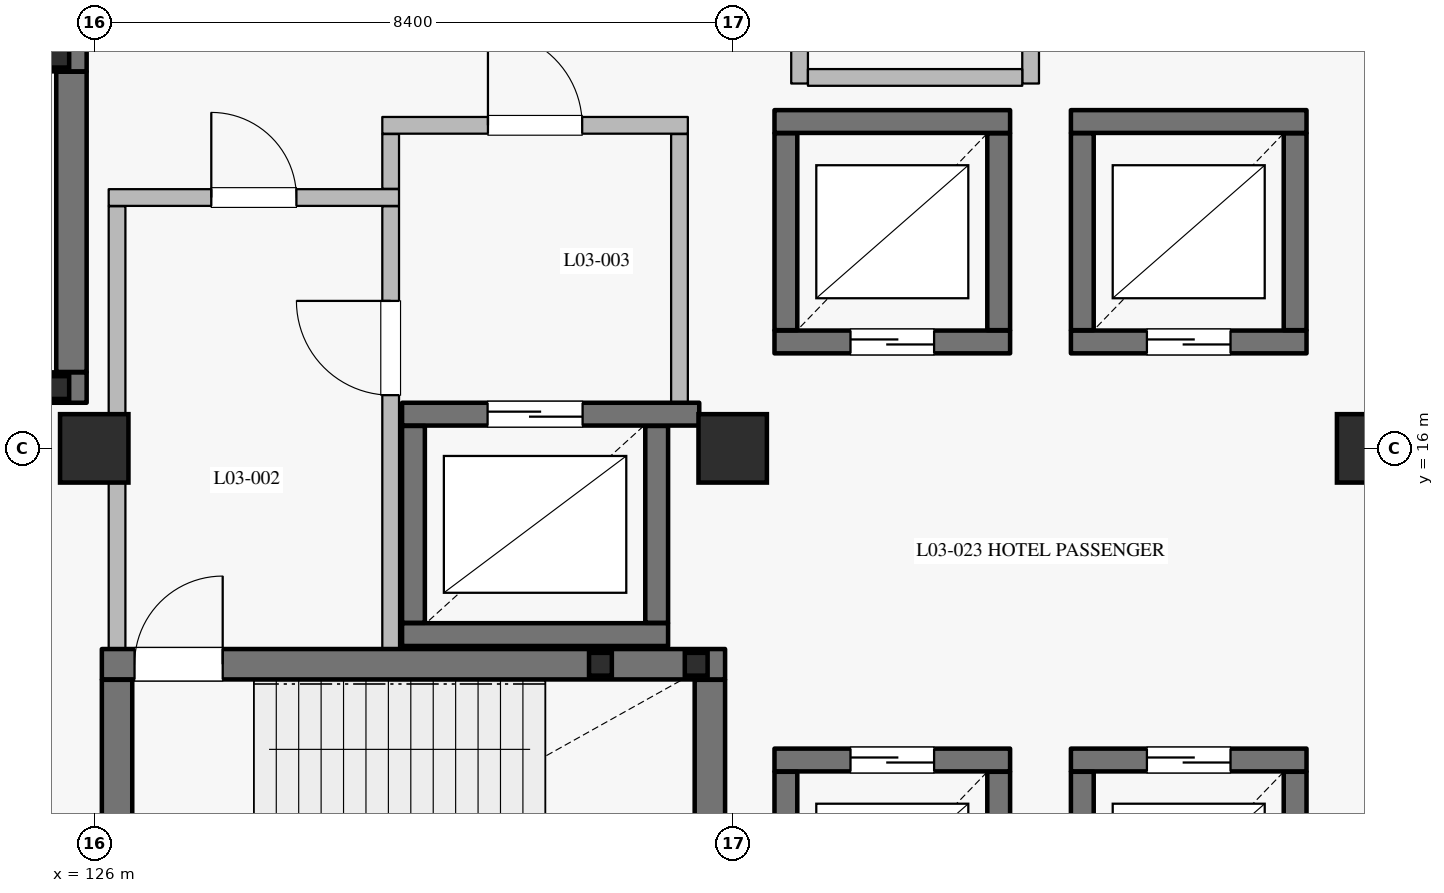
"""IFC4 building model, lengths in metres.
Left out: names, types, materials, properties, quantities, classifications, styles, units other than length and angle.
Written with IfcOpenShell. Run it as: python <this file> out.ifc"""

import sys

from ifc_helpers import new_model, si_unit, direction, frame, frame_2d, origin, origin_2d, place, context, subcontext, project, spatial, rectangle, hollow_rectangle, extrude, element, fill, save


model = new_model("IFC4")
c1 = context("Model", 3, precision=1e-05, world=origin(), true_north=direction((0.0, 1.0)))
c2 = subcontext(c1, "Body", "Model", "MODEL_VIEW")
j1 = project(units=[si_unit("LENGTHUNIT", "METRE"), si_unit("PLANEANGLEUNIT", "RADIAN")], contexts=[c1])
p1 = place(None, origin())
s1 = spatial("IfcSite", under=j1, at=p1, CompositionType="ELEMENT")
p2 = place(p1, origin())
s2 = spatial("IfcBuilding", under=s1, at=p2, CompositionType="ELEMENT")
p3 = place(p2, frame((0.0, 0.0, 16.2)))
s3 = spatial("IfcBuildingStorey", under=s2, at=p3, CompositionType="ELEMENT", Elevation=16.2)
for number, where, z_axis, x_axis in (
    (1, (126.0, 16.0, 0.0), (0.0, 0.0, 1.0), (1.0, 0.0, 0.0)),
    (2, (134.4, 16.0, 0.0), (0.0, 0.0, 1.0), (1.0, 0.0, 0.0)),
    (3, (142.8, 16.0, 0.0), (0.0, 0.0, 1.0), (1.0, 0.0, 0.0)),
):
    element("IfcColumn", number, at=place(p3, frame(where, z_axis=z_axis, x_axis=x_axis)), inside=s3, PredefinedType="COLUMN", context=c2, shape_type="SweptSolid", body=[
        extrude(rectangle(XDim=0.9, YDim=0.9, at=origin_2d()), origin(), (0.0, 0.0, 1.0), 4.8),
    ])
p4 = place(p3, frame((134.95, 17.4, 0.0), z_axis=(0.0, 0.0, 1.0), x_axis=(1.0, 0.0, 0.0)))
e4 = element("IfcWall", 4, at=p4, inside=s3, PredefinedType="SHEAR", context=c2, shape_type="SweptSolid", body=[
    extrude(rectangle(XDim=3.1, YDim=0.3, at=frame_2d((1.55, 0.0))), origin(), (0.0, 0.0, 1.0), 4.535),
])
p5 = place(p4, frame((1.0, 0.0, 0.0)))
e5 = element("IfcOpeningElement", 5, at=p5, cuts=e4, PredefinedType="OPENING", context=c2, shape_type="SweptSolid", body=[
    extrude(rectangle(XDim=1.1, YDim=2.2, at=frame_2d((0.55, 1.1))), frame((0.0, 0.16, 0.0), z_axis=(0.0, -1.0, 0.0), x_axis=(1.0, 0.0, 0.0)), (0.0, 0.0, 1.0), 0.32),
])
p6 = place(p3, frame((137.9, 17.555, 0.0), z_axis=(0.0, 0.0, 1.0), x_axis=(0.0, 1.0, 0.0)))
e6 = element("IfcWall", 6, at=p6, inside=s3, PredefinedType="SHEAR", context=c2, shape_type="SweptSolid", body=[
    extrude(rectangle(XDim=2.59, YDim=0.3, at=frame_2d((1.295, 0.0))), origin(), (0.0, 0.0, 1.0), 4.535),
])
p7 = place(p3, frame((138.05, 20.3, 0.0), z_axis=(0.0, 0.0, 1.0), x_axis=(-1.0, 0.0, 0.0)))
e7 = element("IfcWall", 7, at=p7, inside=s3, PredefinedType="SHEAR", context=c2, shape_type="SweptSolid", body=[
    extrude(rectangle(XDim=3.1, YDim=0.3, at=frame_2d((1.55, 0.0))), origin(), (0.0, 0.0, 1.0), 4.535),
])
p8 = place(p3, frame((135.1, 20.145, 0.0), z_axis=(0.0, 0.0, 1.0), x_axis=(0.0, -1.0, 0.0)))
e8 = element("IfcWall", 8, at=p8, inside=s3, PredefinedType="SHEAR", context=c2, shape_type="SweptSolid", body=[
    extrude(rectangle(XDim=2.59, YDim=0.3, at=frame_2d((1.295, 0.0))), origin(), (0.0, 0.0, 1.0), 4.535),
])
p9 = place(p3, frame((138.85, 17.4, 0.0), z_axis=(0.0, 0.0, 1.0), x_axis=(1.0, 0.0, 0.0)))
e9 = element("IfcWall", 9, at=p9, inside=s3, PredefinedType="SHEAR", context=c2, shape_type="SweptSolid", body=[
    extrude(rectangle(XDim=3.1, YDim=0.3, at=frame_2d((1.55, 0.0))), origin(), (0.0, 0.0, 1.0), 4.535),
])
p10 = place(p9, frame((1.0, 0.0, 0.0)))
e10 = element("IfcOpeningElement", 10, at=p10, cuts=e9, PredefinedType="OPENING", context=c2, shape_type="SweptSolid", body=[
    extrude(rectangle(XDim=1.1, YDim=2.2, at=frame_2d((0.55, 1.1))), frame((0.0, 0.16, 0.0), z_axis=(0.0, -1.0, 0.0), x_axis=(1.0, 0.0, 0.0)), (0.0, 0.0, 1.0), 0.32),
])
p11 = place(p3, frame((141.8, 17.555, 0.0), z_axis=(0.0, 0.0, 1.0), x_axis=(0.0, 1.0, 0.0)))
e11 = element("IfcWall", 11, at=p11, inside=s3, PredefinedType="SHEAR", context=c2, shape_type="SweptSolid", body=[
    extrude(rectangle(XDim=2.59, YDim=0.3, at=frame_2d((1.295, 0.0))), origin(), (0.0, 0.0, 1.0), 4.535),
])
p12 = place(p3, frame((141.95, 20.3, 0.0), z_axis=(0.0, 0.0, 1.0), x_axis=(-1.0, 0.0, 0.0)))
e12 = element("IfcWall", 12, at=p12, inside=s3, PredefinedType="SHEAR", context=c2, shape_type="SweptSolid", body=[
    extrude(rectangle(XDim=3.1, YDim=0.3, at=frame_2d((1.55, 0.0))), origin(), (0.0, 0.0, 1.0), 4.535),
])
for number, where, z_axis, x_axis in (
    (13, (139.0, 20.145, 0.0), (0.0, 0.0, 1.0), (0.0, -1.0, 0.0)),
    (14, (137.9, 9.155, 0.0), (0.0, 0.0, 1.0), (0.0, 1.0, 0.0)),
):
    element("IfcWall", number, at=place(p3, frame(where, z_axis=z_axis, x_axis=x_axis)), inside=s3, PredefinedType="SHEAR", context=c2, shape_type="SweptSolid", body=[
        extrude(rectangle(XDim=2.59, YDim=0.3, at=frame_2d((1.295, 0.0))), origin(), (0.0, 0.0, 1.0), 4.535),
    ])
p13 = place(p3, frame((138.05, 11.9, 0.0), z_axis=(0.0, 0.0, 1.0), x_axis=(-1.0, 0.0, 0.0)))
e15 = element("IfcWall", 15, at=p13, inside=s3, PredefinedType="SHEAR", context=c2, shape_type="SweptSolid", body=[
    extrude(rectangle(XDim=3.1, YDim=0.3, at=frame_2d((1.55, 0.0))), origin(), (0.0, 0.0, 1.0), 4.535),
])
p14 = place(p13, frame((1.0, 0.0, 0.0)))
e16 = element("IfcOpeningElement", 16, at=p14, cuts=e15, PredefinedType="OPENING", context=c2, shape_type="SweptSolid", body=[
    extrude(rectangle(XDim=1.1, YDim=2.2, at=frame_2d((0.55, 1.1))), frame((0.0, 0.16, 0.0), z_axis=(0.0, -1.0, 0.0), x_axis=(1.0, 0.0, 0.0)), (0.0, 0.0, 1.0), 0.32),
])
for number, where, z_axis, x_axis in (
    (17, (135.1, 11.745, 0.0), (0.0, 0.0, 1.0), (0.0, -1.0, 0.0)),
    (18, (141.8, 9.155, 0.0), (0.0, 0.0, 1.0), (0.0, 1.0, 0.0)),
):
    element("IfcWall", number, at=place(p3, frame(where, z_axis=z_axis, x_axis=x_axis)), inside=s3, PredefinedType="SHEAR", context=c2, shape_type="SweptSolid", body=[
        extrude(rectangle(XDim=2.59, YDim=0.3, at=frame_2d((1.295, 0.0))), origin(), (0.0, 0.0, 1.0), 4.535),
    ])
p15 = place(p3, frame((141.95, 11.9, 0.0), z_axis=(0.0, 0.0, 1.0), x_axis=(-1.0, 0.0, 0.0)))
e19 = element("IfcWall", 19, at=p15, inside=s3, PredefinedType="SHEAR", context=c2, shape_type="SweptSolid", body=[
    extrude(rectangle(XDim=3.1, YDim=0.3, at=frame_2d((1.55, 0.0))), origin(), (0.0, 0.0, 1.0), 4.535),
])
p16 = place(p15, frame((1.0, 0.0, 0.0)))
e20 = element("IfcOpeningElement", 20, at=p16, cuts=e19, PredefinedType="OPENING", context=c2, shape_type="SweptSolid", body=[
    extrude(rectangle(XDim=1.1, YDim=2.2, at=frame_2d((0.55, 1.1))), frame((0.0, 0.16, 0.0), z_axis=(0.0, -1.0, 0.0), x_axis=(1.0, 0.0, 0.0)), (0.0, 0.0, 1.0), 0.32),
])
p17 = place(p3, frame((139.0, 11.745, 0.0), z_axis=(0.0, 0.0, 1.0), x_axis=(0.0, -1.0, 0.0)))
e21 = element("IfcWall", 21, at=p17, inside=s3, PredefinedType="SHEAR", context=c2, shape_type="SweptSolid", body=[
    extrude(rectangle(XDim=2.59, YDim=0.3, at=frame_2d((1.295, 0.0))), origin(), (0.0, 0.0, 1.0), 4.535),
])
p18 = place(p3, frame((130.05, 13.55, 0.0), z_axis=(0.0, 0.0, 1.0), x_axis=(1.0, 0.0, 0.0)))
e22 = element("IfcWall", 22, at=p18, inside=s3, PredefinedType="SHEAR", context=c2, shape_type="SweptSolid", body=[
    extrude(rectangle(XDim=3.5, YDim=0.3, at=frame_2d((1.75, 0.0))), origin(), (0.0, 0.0, 1.0), 4.535),
])
p19 = place(p3, frame((133.4, 13.705, 0.0), z_axis=(0.0, 0.0, 1.0), x_axis=(0.0, 1.0, 0.0)))
e23 = element("IfcWall", 23, at=p19, inside=s3, PredefinedType="SHEAR", context=c2, shape_type="SweptSolid", body=[
    extrude(rectangle(XDim=2.59, YDim=0.3, at=frame_2d((1.295, 0.0))), origin(), (0.0, 0.0, 1.0), 4.535),
])
p20 = place(p3, frame((133.96, 16.45, 0.0), z_axis=(0.0, 0.0, 1.0), x_axis=(-1.0, 0.0, 0.0)))
e24 = element("IfcWall", 24, at=p20, inside=s3, PredefinedType="SHEAR", context=c2, shape_type="SweptSolid", body=[
    extrude(rectangle(XDim=3.91, YDim=0.3, at=frame_2d((1.955, 0.0))), origin(), (0.0, 0.0, 1.0), 4.535),
])
p21 = place(p20, frame((1.535, 0.0, 0.0)))
e25 = element("IfcOpeningElement", 25, at=p21, cuts=e24, PredefinedType="OPENING", context=c2, shape_type="SweptSolid", body=[
    extrude(rectangle(XDim=1.25, YDim=2.25, at=frame_2d((0.625, 1.125))), frame((0.0, 0.16, 0.0), z_axis=(0.0, -1.0, 0.0), x_axis=(1.0, 0.0, 0.0)), (0.0, 0.0, 1.0), 0.32),
])
p22 = place(p3, frame((130.2, 16.295, 0.0), z_axis=(0.0, 0.0, 1.0), x_axis=(0.0, -1.0, 0.0)))
e26 = element("IfcWall", 26, at=p22, inside=s3, PredefinedType="SHEAR", context=c2, shape_type="SweptSolid", body=[
    extrude(rectangle(XDim=2.59, YDim=0.3, at=frame_2d((1.295, 0.0))), origin(), (0.0, 0.0, 1.0), 4.535),
])
p23 = place(p3, frame((134.1, 9.005, 0.0), z_axis=(0.0, 0.0, 1.0), x_axis=(0.0, 1.0, 0.0)))
e27 = element("IfcWall", 27, at=p23, inside=s3, PredefinedType="SHEAR", context=c2, shape_type="SweptSolid", body=[
    extrude(rectangle(XDim=3.95, YDim=0.4, at=frame_2d((1.975, 0.0))), origin(), (0.0, 0.0, 1.0), 4.535),
])
p24 = place(p3, frame((126.1, 13.16, 0.0), z_axis=(0.0, 0.0, 1.0), x_axis=(1.0, 0.0, 0.0)))
e28 = element("IfcWall", 28, at=p24, inside=s3, PredefinedType="SHEAR", context=c2, shape_type="SweptSolid", body=[
    extrude(rectangle(XDim=8.2, YDim=0.4, at=frame_2d((4.1, 0.0))), origin(), (0.0, 0.0, 1.0), 4.535),
])
p25 = place(p24, frame((0.43, 0.0, 0.0)))
e29 = element("IfcOpeningElement", 29, at=p25, cuts=e28, PredefinedType="OPENING", context=c2, shape_type="SweptSolid", body=[
    extrude(rectangle(XDim=1.16, YDim=2.2, at=frame_2d((0.58, 1.1))), frame((0.0, 0.21, 0.0), z_axis=(0.0, -1.0, 0.0), x_axis=(1.0, 0.0, 0.0)), (0.0, 0.0, 1.0), 0.42),
])
p26 = place(p3, frame((126.3, 9.005, 0.0), z_axis=(0.0, 0.0, 1.0), x_axis=(0.0, 1.0, 0.0)))
e30 = element("IfcWall", 30, at=p26, inside=s3, PredefinedType="SHEAR", context=c2, shape_type="SweptSolid", body=[
    extrude(rectangle(XDim=3.95, YDim=0.4, at=frame_2d((1.975, 0.0))), origin(), (0.0, 0.0, 1.0), 4.535),
])
p27 = place(p3, frame((126.3, 13.365, 0.0), z_axis=(0.0, 0.0, 1.0), x_axis=(0.0, 1.0, 0.0)))
e31 = element("IfcWall", 31, at=p27, inside=s3, PredefinedType="PARTITIONING", context=c2, shape_type="SweptSolid", body=[
    extrude(rectangle(XDim=5.82, YDim=0.22, at=frame_2d((2.91, 0.0))), origin(), (0.0, 0.0, 1.0), 4.535),
])
p28 = place(p3, frame((126.19, 19.3, 0.0), z_axis=(0.0, 0.0, 1.0), x_axis=(1.0, 0.0, 0.0)))
e32 = element("IfcWall", 32, at=p28, inside=s3, PredefinedType="PARTITIONING", context=c2, shape_type="SweptSolid", body=[
    extrude(rectangle(XDim=3.82, YDim=0.22, at=frame_2d((1.91, 0.0))), origin(), (0.0, 0.0, 1.0), 4.535),
])
p29 = place(p28, frame((1.35, 0.0, 0.0)))
e33 = element("IfcOpeningElement", 33, at=p29, cuts=e32, PredefinedType="OPENING", context=c2, shape_type="SweptSolid", body=[
    extrude(rectangle(XDim=1.12, YDim=2.2, at=frame_2d((0.56, 1.1))), frame((0.0, 0.12, 0.0), z_axis=(0.0, -1.0, 0.0), x_axis=(1.0, 0.0, 0.0)), (0.0, 0.0, 1.0), 0.24),
])
p30 = place(p3, frame((129.9, 13.365, 0.0), z_axis=(0.0, 0.0, 1.0), x_axis=(0.0, 1.0, 0.0)))
e34 = element("IfcWall", 34, at=p30, inside=s3, PredefinedType="PARTITIONING", context=c2, shape_type="SweptSolid", body=[
    extrude(rectangle(XDim=5.82, YDim=0.22, at=frame_2d((2.91, 0.0))), origin(), (0.0, 0.0, 1.0), 4.535),
])
p31 = place(p30, frame((3.335, 0.0, 0.0)))
e35 = element("IfcOpeningElement", 35, at=p31, cuts=e34, PredefinedType="OPENING", context=c2, shape_type="SweptSolid", body=[
    extrude(rectangle(XDim=1.24, YDim=2.2, at=frame_2d((0.62, 1.1))), frame((0.0, 0.12, 0.0), z_axis=(0.0, -1.0, 0.0), x_axis=(1.0, 0.0, 0.0)), (0.0, 0.0, 1.0), 0.24),
])
p32 = place(p3, frame((129.9, 19.415, 0.0), z_axis=(0.0, 0.0, 1.0), x_axis=(0.0, 1.0, 0.0)))
e36 = element("IfcWall", 36, at=p32, inside=s3, PredefinedType="PARTITIONING", context=c2, shape_type="SweptSolid", body=[
    extrude(rectangle(XDim=0.72, YDim=0.22, at=frame_2d((0.36, 0.0))), origin(), (0.0, 0.0, 1.0), 4.535),
])
p33 = place(p3, frame((133.7, 16.605, 0.0), z_axis=(0.0, 0.0, 1.0), x_axis=(0.0, 1.0, 0.0)))
e37 = element("IfcWall", 37, at=p33, inside=s3, PredefinedType="PARTITIONING", context=c2, shape_type="SweptSolid", body=[
    extrude(rectangle(XDim=3.53, YDim=0.22, at=frame_2d((1.765, 0.0))), origin(), (0.0, 0.0, 1.0), 4.535),
])
p34 = place(p3, frame((129.79, 20.25, 0.0), z_axis=(0.0, 0.0, 1.0), x_axis=(1.0, 0.0, 0.0)))
e38 = element("IfcWall", 38, at=p34, inside=s3, PredefinedType="PARTITIONING", context=c2, shape_type="SweptSolid", body=[
    extrude(rectangle(XDim=4.02, YDim=0.22, at=frame_2d((2.01, 0.0))), origin(), (0.0, 0.0, 1.0), 4.535),
])
p35 = place(p34, frame((1.39, 0.0, 0.0)))
e39 = element("IfcOpeningElement", 39, at=p35, cuts=e38, PredefinedType="OPENING", context=c2, shape_type="SweptSolid", body=[
    extrude(rectangle(XDim=1.24, YDim=2.2, at=frame_2d((0.62, 1.1))), frame((0.0, 0.12, 0.0), z_axis=(0.0, -1.0, 0.0), x_axis=(1.0, 0.0, 0.0)), (0.0, 0.0, 1.0), 0.24),
])
for number, where, z_axis, x_axis in (
    (40, (132.66, 13.16, -2.4), (0.0, 0.0, 1.0), (1.0, 0.0, 0.0)),
    (41, (133.92, 13.16, -2.4), (0.0, 0.0, 1.0), (1.0, 0.0, 0.0)),
):
    element("IfcColumn", number, at=place(p3, frame(where, z_axis=z_axis, x_axis=x_axis)), inside=s3, PredefinedType="COLUMN", context=c2, shape_type="SweptSolid", body=[
        extrude(hollow_rectangle(XDim=0.3, YDim=0.3, WallThickness=0.012, at=origin_2d()), origin(), (0.0, 0.0, 1.0), 4.62),
    ])
p36 = place(p3, frame((117.7, 16.8, 0.0), z_axis=(0.0, 0.0, 1.0), x_axis=(1.0, 0.0, 0.0)))
e42 = element("IfcWall", 42, at=p36, inside=s3, PredefinedType="SHEAR", context=c2, shape_type="SweptSolid", body=[
    extrude(rectangle(XDim=8.2, YDim=0.4, at=frame_2d((4.1, 0.0))), origin(), (0.0, 0.0, 1.0), 4.535),
])
p37 = place(p3, frame((125.7, 17.005, 0.0), z_axis=(0.0, 0.0, 1.0), x_axis=(0.0, 1.0, 0.0)))
e43 = element("IfcWall", 43, at=p37, inside=s3, PredefinedType="SHEAR", context=c2, shape_type="SweptSolid", body=[
    extrude(rectangle(XDim=3.95, YDim=0.4, at=frame_2d((1.975, 0.0))), origin(), (0.0, 0.0, 1.0), 4.535),
])
p38 = place(p3, frame((117.7, 21.16, 0.0), z_axis=(0.0, 0.0, 1.0), x_axis=(1.0, 0.0, 0.0)))
e44 = element("IfcWall", 44, at=p38, inside=s3, PredefinedType="SHEAR", context=c2, shape_type="SweptSolid", body=[
    extrude(rectangle(XDim=8.2, YDim=0.4, at=frame_2d((4.1, 0.0))), origin(), (0.0, 0.0, 1.0), 4.535),
])
p39 = place(p38, frame((0.43, 0.0, 0.0)))
e45 = element("IfcOpeningElement", 45, at=p39, cuts=e44, PredefinedType="OPENING", context=c2, shape_type="SweptSolid", body=[
    extrude(rectangle(XDim=1.16, YDim=2.2, at=frame_2d((0.58, 1.1))), frame((0.0, 0.21, 0.0), z_axis=(0.0, -1.0, 0.0), x_axis=(1.0, 0.0, 0.0)), (0.0, 0.0, 1.0), 0.42),
])
for number, where, z_axis, x_axis in (
    (46, (125.52, 16.8, -2.4), (0.0, 0.0, 1.0), (1.0, 0.0, 0.0)),
    (47, (125.52, 21.16, -2.4), (0.0, 0.0, 1.0), (1.0, 0.0, 0.0)),
):
    element("IfcColumn", number, at=place(p3, frame(where, z_axis=z_axis, x_axis=x_axis)), inside=s3, PredefinedType="COLUMN", context=c2, shape_type="SweptSolid", body=[
        extrude(hollow_rectangle(XDim=0.3, YDim=0.3, WallThickness=0.012, at=origin_2d()), origin(), (0.0, 0.0, 1.0), 4.62),
    ])
for number, where, z_axis, x_axis in (
    (48, (135.28, 20.8, 0.0), (0.0, 0.0, 1.0), (0.0, 1.0, 0.0)),
    (49, (138.32, 20.8, 0.0), (0.0, 0.0, 1.0), (0.0, 1.0, 0.0)),
):
    element("IfcWall", number, at=place(p3, frame(where, z_axis=z_axis, x_axis=x_axis)), inside=s3, PredefinedType="PARTITIONING", context=c2, shape_type="SweptSolid", body=[
        extrude(rectangle(XDim=2.748, YDim=0.22, at=frame_2d((1.374, 0.0))), origin(), (0.0, 0.0, 1.0), 4.535),
    ])
p40 = place(p3, frame((135.39, 20.88, 0.0), z_axis=(0.0, 0.0, 1.0), x_axis=(1.0, 0.0, 0.0)))
e50 = element("IfcWall", 50, at=p40, inside=s3, PredefinedType="PARTITIONING", context=c2, shape_type="SweptSolid", body=[
    extrude(rectangle(XDim=2.82, YDim=0.22, at=frame_2d((1.41, 0.0))), origin(), (0.0, 0.0, 1.0), 4.535),
])
p41 = place(p5, origin())
e51 = element("IfcDoor", 51, at=p41, inside=s3, OperationType="DOUBLE_DOOR_SLIDING", PredefinedType="DOOR", context=c2, shape_type="SweptSolid", body=[
    extrude(rectangle(XDim=1.1, YDim=2.2, at=frame_2d((0.55, 1.1))), frame((0.0, 0.025, 0.0), z_axis=(0.0, -1.0, 0.0), x_axis=(1.0, 0.0, 0.0)), (0.0, 0.0, 1.0), 0.05),
])
fill(e5, e51)
p42 = place(p10, origin())
e52 = element("IfcDoor", 52, at=p42, inside=s3, OperationType="DOUBLE_DOOR_SLIDING", PredefinedType="DOOR", context=c2, shape_type="SweptSolid", body=[
    extrude(rectangle(XDim=1.1, YDim=2.2, at=frame_2d((0.55, 1.1))), frame((0.0, 0.025, 0.0), z_axis=(0.0, -1.0, 0.0), x_axis=(1.0, 0.0, 0.0)), (0.0, 0.0, 1.0), 0.05),
])
fill(e10, e52)
p43 = place(p14, origin())
e53 = element("IfcDoor", 53, at=p43, inside=s3, OperationType="DOUBLE_DOOR_SLIDING", PredefinedType="DOOR", context=c2, shape_type="SweptSolid", body=[
    extrude(rectangle(XDim=1.1, YDim=2.2, at=frame_2d((0.55, 1.1))), frame((0.0, 0.025, 0.0), z_axis=(0.0, -1.0, 0.0), x_axis=(1.0, 0.0, 0.0)), (0.0, 0.0, 1.0), 0.05),
])
fill(e16, e53)
p44 = place(p16, origin())
e54 = element("IfcDoor", 54, at=p44, inside=s3, OperationType="DOUBLE_DOOR_SLIDING", PredefinedType="DOOR", context=c2, shape_type="SweptSolid", body=[
    extrude(rectangle(XDim=1.1, YDim=2.2, at=frame_2d((0.55, 1.1))), frame((0.0, 0.025, 0.0), z_axis=(0.0, -1.0, 0.0), x_axis=(1.0, 0.0, 0.0)), (0.0, 0.0, 1.0), 0.05),
])
fill(e20, e54)
p45 = place(p21, origin())
e55 = element("IfcDoor", 55, at=p45, inside=s3, OperationType="DOUBLE_DOOR_SLIDING", PredefinedType="DOOR", context=c2, shape_type="SweptSolid", body=[
    extrude(rectangle(XDim=1.25, YDim=2.25, at=frame_2d((0.625, 1.125))), frame((0.0, 0.025, 0.0), z_axis=(0.0, -1.0, 0.0), x_axis=(1.0, 0.0, 0.0)), (0.0, 0.0, 1.0), 0.05),
])
fill(e25, e55)
p46 = place(p25, origin())
e56 = element("IfcDoor", 56, at=p46, inside=s3, OperationType="SINGLE_SWING_RIGHT", PredefinedType="DOOR", context=c2, shape_type="SweptSolid", body=[
    extrude(rectangle(XDim=1.16, YDim=2.2, at=frame_2d((0.58, 1.1))), frame((0.0, 0.025, 0.0), z_axis=(0.0, -1.0, 0.0), x_axis=(1.0, 0.0, 0.0)), (0.0, 0.0, 1.0), 0.05),
])
fill(e29, e56)
p47 = place(p29, origin())
e57 = element("IfcDoor", 57, at=p47, inside=s3, OperationType="SINGLE_SWING_LEFT", PredefinedType="DOOR", context=c2, shape_type="SweptSolid", body=[
    extrude(rectangle(XDim=1.12, YDim=2.2, at=frame_2d((0.56, 1.1))), frame((0.0, 0.025, 0.0), z_axis=(0.0, -1.0, 0.0), x_axis=(1.0, 0.0, 0.0)), (0.0, 0.0, 1.0), 0.05),
])
fill(e33, e57)
p48 = place(p31, origin())
e58 = element("IfcDoor", 58, at=p48, inside=s3, OperationType="SINGLE_SWING_RIGHT", PredefinedType="DOOR", context=c2, shape_type="SweptSolid", body=[
    extrude(rectangle(XDim=1.24, YDim=2.2, at=frame_2d((0.62, 1.1))), frame((0.0, 0.025, 0.0), z_axis=(0.0, -1.0, 0.0), x_axis=(1.0, 0.0, 0.0)), (0.0, 0.0, 1.0), 0.05),
])
fill(e35, e58)
p49 = place(p35, origin())
e59 = element("IfcDoor", 59, at=p49, inside=s3, OperationType="SINGLE_SWING_LEFT", PredefinedType="DOOR", context=c2, shape_type="SweptSolid", body=[
    extrude(rectangle(XDim=1.24, YDim=2.2, at=frame_2d((0.62, 1.1))), frame((0.0, 0.025, 0.0), z_axis=(0.0, -1.0, 0.0), x_axis=(1.0, 0.0, 0.0)), (0.0, 0.0, 1.0), 0.05),
])
fill(e39, e59)
save(model, sys.argv[1])
